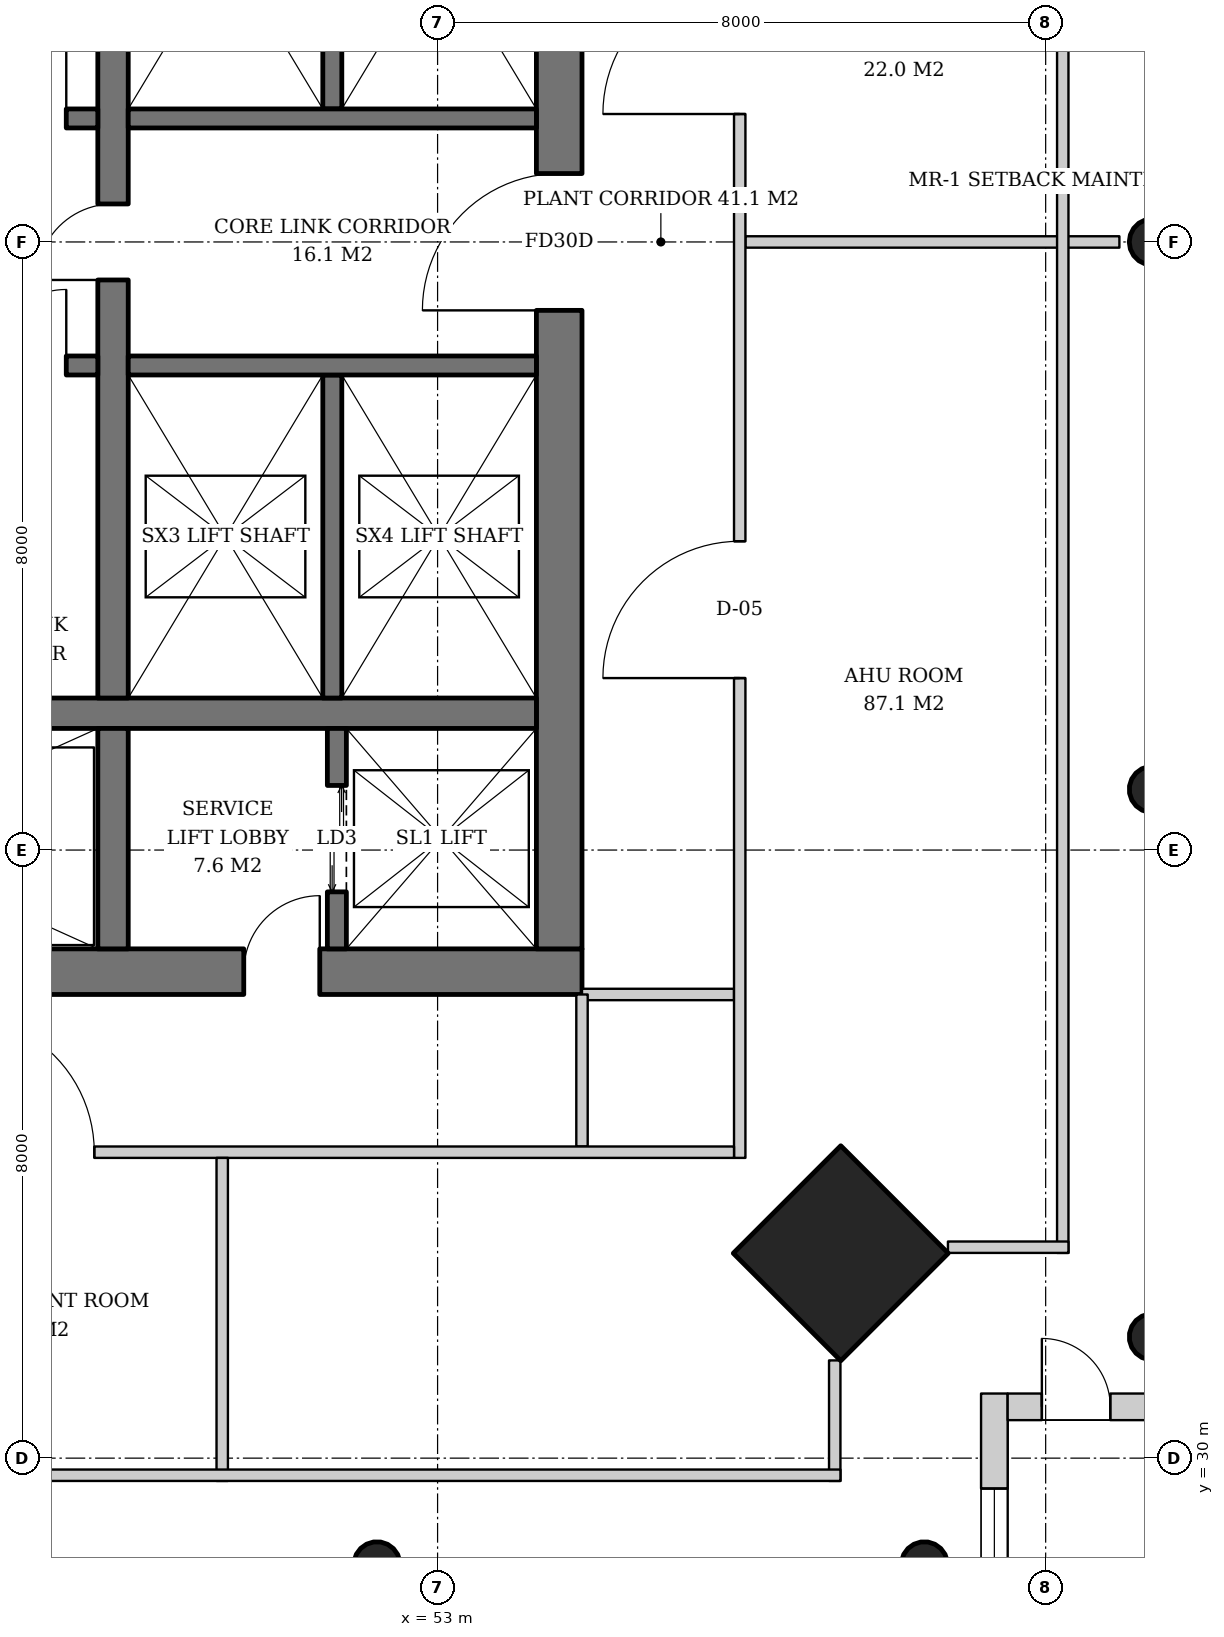
"""IFC4 building model, lengths in metres.
Left out: names, types, materials, properties, quantities, classifications, styles, units other than length and angle.
Written with IfcOpenShell. Run it as: python <this file> out.ifc"""

import sys

from ifc_helpers import new_model, si_unit, direction, frame, frame_2d, origin, origin_2d, place, context, subcontext, project, spatial, rectangle, hollow_circle, extrude, element, fill, save


model = new_model("IFC4")
c1 = context("Model", 3, precision=1e-05, world=origin(), true_north=direction((0.0, 1.0)))
c2 = subcontext(c1, "Body", "Model", "MODEL_VIEW")
j1 = project(units=[si_unit("LENGTHUNIT", "METRE"), si_unit("PLANEANGLEUNIT", "RADIAN")], contexts=[c1])
p1 = place(None, origin())
s1 = spatial("IfcSite", under=j1, at=p1, CompositionType="ELEMENT")
p2 = place(p1, origin())
s2 = spatial("IfcBuilding", under=s1, at=p2, CompositionType="ELEMENT")
p3 = place(p2, frame((0.0, 0.0, 226.2)))
s3 = spatial("IfcBuildingStorey", under=s2, at=p3, CompositionType="ELEMENT", Elevation=226.2)
p4 = place(p3, frame((62.443, 31.557, 0.0), z_axis=(-0.031898107953, 0.031898107953, 0.998981992539), x_axis=(-0.707106781187, -0.707106781187, 0.0)))
e1 = element("IfcColumn", 1, at=p4, inside=s3, PredefinedType="COLUMN", context=c2, shape_type="SweptSolid", body=[
    extrude(hollow_circle(Radius=0.305, WallThickness=0.025, at=origin_2d()), origin(), (0.0, 0.0, 1.0), 3.804),
])
p5 = place(p3, frame((62.443, 38.779, 0.0), z_axis=(-0.031910269556, 0.015987237665, 0.999362868496), x_axis=(-0.447933021895, -0.894067115991, 0.0)))
e2 = element("IfcColumn", 2, at=p5, inside=s3, PredefinedType="COLUMN", context=c2, shape_type="SweptSolid", body=[
    extrude(hollow_circle(Radius=0.305, WallThickness=0.025, at=origin_2d()), origin(), (0.0, 0.0, 1.0), 3.802),
])
p6 = place(p3, frame((62.443, 46.0, 0.0), z_axis=(-0.031914348339, 0.0, 0.999490607445), x_axis=(0.0, -1.0, 0.0)))
e3 = element("IfcColumn", 3, at=p6, inside=s3, PredefinedType="COLUMN", context=c2, shape_type="SweptSolid", body=[
    extrude(hollow_circle(Radius=0.305, WallThickness=0.025, at=origin_2d()), origin(), (0.0, 0.0, 1.0), 3.802),
])
p7 = place(p3, frame((58.343, 32.657, 0.0), z_axis=(-0.031898107953, 0.031898107953, 0.998981992539), x_axis=(-0.707106781187, -0.707106781187, 0.0)))
e4 = element("IfcColumn", 4, at=p7, inside=s3, PredefinedType="COLUMN", context=c2, shape_type="SweptSolid", body=[
    extrude(rectangle(XDim=2.0, YDim=2.0, at=origin_2d()), origin(), (0.0, 0.0, 1.0), 3.804),
])
p8 = place(p3, frame((59.443, 28.557, 0.0), z_axis=(-0.031898107953, 0.031898107953, 0.998981992539), x_axis=(-0.707106781187, -0.707106781187, 0.0)))
e5 = element("IfcColumn", 5, at=p8, inside=s3, PredefinedType="COLUMN", context=c2, shape_type="SweptSolid", body=[
    extrude(hollow_circle(Radius=0.305, WallThickness=0.025, at=origin_2d()), origin(), (0.0, 0.0, 1.0), 3.804),
])
p9 = place(p3, frame((52.221, 28.557, 0.0), z_axis=(-0.015987237665, 0.031910269556, 0.999362868496), x_axis=(-0.894067115991, -0.447933021895, 0.0)))
e6 = element("IfcColumn", 6, at=p9, inside=s3, PredefinedType="COLUMN", context=c2, shape_type="SweptSolid", body=[
    extrude(hollow_circle(Radius=0.305, WallThickness=0.025, at=origin_2d()), origin(), (0.0, 0.0, 1.0), 3.802),
])
p10 = place(p3, frame((35.1, 36.4, 0.0), z_axis=(0.0, 0.0, 1.0), x_axis=(1.0, 0.0, 0.0)))
e7 = element("IfcWall", 7, at=p10, inside=s3, PredefinedType="SHEAR", context=c2, shape_type="SweptSolid", body=[
    extrude(rectangle(XDim=19.8, YDim=0.6, at=frame_2d((9.9, 0.0))), origin(), (0.0, 0.0, 1.0), 3.8),
])
p11 = place(p10, frame((3.9, 0.0, 0.0)))
e8 = element("IfcOpeningElement", 8, at=p11, cuts=e7, PredefinedType="OPENING", context=c2, shape_type="SweptSolid", body=[
    extrude(rectangle(XDim=1.0, YDim=2.1, at=frame_2d((0.5, 1.05))), frame((0.0, 0.31, 0.0), z_axis=(0.0, -1.0, 0.0), x_axis=(1.0, 0.0, 0.0)), (0.0, 0.0, 1.0), 0.62),
])
p12 = place(p10, frame((15.35, 0.0, 0.0)))
e9 = element("IfcOpeningElement", 9, at=p12, cuts=e7, PredefinedType="OPENING", context=c2, shape_type="SweptSolid", body=[
    extrude(rectangle(XDim=1.0, YDim=2.1, at=frame_2d((0.5, 1.05))), frame((0.0, 0.31, 0.0), z_axis=(0.0, -1.0, 0.0), x_axis=(1.0, 0.0, 0.0)), (0.0, 0.0, 1.0), 0.62),
])
p13 = place(p3, frame((54.6, 36.7, 0.0), z_axis=(0.0, 0.0, 1.0), x_axis=(0.0, 1.0, 0.0)))
e10 = element("IfcWall", 10, at=p13, inside=s3, PredefinedType="SHEAR", context=c2, shape_type="SweptSolid", body=[
    extrude(rectangle(XDim=18.6, YDim=0.6, at=frame_2d((9.3, 0.0))), origin(), (0.0, 0.0, 1.0), 3.8),
])
p14 = place(p13, frame((8.4, 0.0, 0.0)))
e11 = element("IfcOpeningElement", 11, at=p14, cuts=e10, PredefinedType="OPENING", context=c2, shape_type="SweptSolid", body=[
    extrude(rectangle(XDim=1.8, YDim=2.4, at=frame_2d((0.9, 1.2))), frame((0.0, 0.31, 0.0), z_axis=(0.0, -1.0, 0.0), x_axis=(1.0, 0.0, 0.0)), (0.0, 0.0, 1.0), 0.62),
])
p15 = place(p3, frame((35.7, 39.8, 0.0), z_axis=(0.0, 0.0, 1.0), x_axis=(1.0, 0.0, 0.0)))
e12 = element("IfcWall", 12, at=p15, inside=s3, PredefinedType="SHEAR", context=c2, shape_type="SweptSolid", body=[
    extrude(rectangle(XDim=18.6, YDim=0.4, at=frame_2d((9.3, 0.0))), origin(), (0.0, 0.0, 1.0), 3.8),
])
p16 = place(p15, frame((3.3, 0.0, 0.0)))
e13 = element("IfcOpeningElement", 13, at=p16, cuts=e12, PredefinedType="OPENING", context=c2, shape_type="SweptSolid", body=[
    extrude(rectangle(XDim=1.0, YDim=2.1, at=frame_2d((0.5, 1.05))), frame((0.0, 0.21, 0.0), z_axis=(0.0, -1.0, 0.0), x_axis=(1.0, 0.0, 0.0)), (0.0, 0.0, 1.0), 0.42),
])
p17 = place(p3, frame((48.73, 36.7, 0.0), z_axis=(0.0, 0.0, 1.0), x_axis=(0.0, 1.0, 0.0)))
e14 = element("IfcWall", 14, at=p17, inside=s3, PredefinedType="SHEAR", context=c2, shape_type="SweptSolid", body=[
    extrude(rectangle(XDim=2.9, YDim=0.4, at=frame_2d((1.45, 0.0))), origin(), (0.0, 0.0, 1.0), 3.8),
])
p18 = place(p3, frame((48.73, 40.0, 0.0), z_axis=(0.0, 0.0, 1.0), x_axis=(0.0, 1.0, 0.0)))
e15 = element("IfcWall", 15, at=p18, inside=s3, PredefinedType="SHEAR", context=c2, shape_type="SweptSolid", body=[
    extrude(rectangle(XDim=12.0, YDim=0.4, at=frame_2d((6.0, 0.0))), origin(), (0.0, 0.0, 1.0), 3.8),
])
p19 = place(p18, frame((5.5, 0.0, 0.0)))
e16 = element("IfcOpeningElement", 16, at=p19, cuts=e15, PredefinedType="OPENING", context=c2, shape_type="SweptSolid", body=[
    extrude(rectangle(XDim=1.0, YDim=2.1, at=frame_2d((0.5, 1.05))), frame((0.0, 0.21, 0.0), z_axis=(0.0, -1.0, 0.0), x_axis=(1.0, 0.0, 0.0)), (0.0, 0.0, 1.0), 0.42),
])
p20 = place(p3, frame((60.325, 27.5, 0.0), z_axis=(0.0, 0.0, 1.0), x_axis=(0.0, 1.0, 0.0)))
e17 = element("IfcWall", 17, at=p20, inside=s3, PredefinedType="SOLIDWALL", context=c2, shape_type="SweptSolid", body=[
    extrude(rectangle(XDim=3.35, YDim=0.35, at=frame_2d((1.675, 0.0))), origin(), (0.0, 0.0, 1.0), 3.52),
])
p21 = place(p20, frame((0.9, 0.0, 0.6)))
e18 = element("IfcOpeningElement", 18, at=p21, cuts=e17, PredefinedType="OPENING", context=c2, shape_type="SweptSolid", body=[
    extrude(rectangle(XDim=1.2, YDim=2.55, at=frame_2d((0.6, 1.275))), frame((0.0, 0.185, 0.0), z_axis=(0.0, -1.0, 0.0), x_axis=(1.0, 0.0, 0.0)), (0.0, 0.0, 1.0), 0.37),
])
p22 = place(p3, frame((60.5, 30.675, 0.0), z_axis=(0.0, 0.0, 1.0), x_axis=(1.0, 0.0, 0.0)))
e19 = element("IfcWall", 19, at=p22, inside=s3, PredefinedType="SOLIDWALL", context=c2, shape_type="SweptSolid", body=[
    extrude(rectangle(XDim=3.0, YDim=0.35, at=frame_2d((1.5, 0.0))), origin(), (0.0, 0.0, 1.0), 3.52),
])
p23 = place(p22, frame((0.45, 0.0, 0.0)))
e20 = element("IfcOpeningElement", 20, at=p23, cuts=e19, PredefinedType="OPENING", context=c2, shape_type="SweptSolid", body=[
    extrude(rectangle(XDim=0.9, YDim=2.1, at=frame_2d((0.45, 1.05))), frame((0.0, 0.185, 0.0), z_axis=(0.0, -1.0, 0.0), x_axis=(1.0, 0.0, 0.0)), (0.0, 0.0, 1.0), 0.37),
])
p24 = place(p3, frame((51.675, 36.7, 0.0), z_axis=(0.0, 0.0, 1.0), x_axis=(0.0, 1.0, 0.0)))
e21 = element("IfcWall", 21, at=p24, inside=s3, PredefinedType="SHEAR", context=c2, shape_type="SweptSolid", body=[
    extrude(rectangle(XDim=2.9, YDim=0.25, at=frame_2d((1.45, 0.0))), origin(), (0.0, 0.0, 1.0), 3.8),
])
p25 = place(p24, frame((0.75, 0.0, 0.0)))
e22 = element("IfcOpeningElement", 22, at=p25, cuts=e21, PredefinedType="OPENING", context=c2, shape_type="SweptSolid", body=[
    extrude(rectangle(XDim=1.4, YDim=2.4, at=frame_2d((0.7, 1.2))), frame((0.0, 0.135, 0.0), z_axis=(0.0, -1.0, 0.0), x_axis=(1.0, 0.0, 0.0)), (0.0, 0.0, 1.0), 0.27),
])
p26 = place(p3, frame((35.7, 47.625, 0.0), z_axis=(0.0, 0.0, 1.0), x_axis=(1.0, 0.0, 0.0)))
e23 = element("IfcWall", 23, at=p26, inside=s3, PredefinedType="SHEAR", context=c2, shape_type="SweptSolid", body=[
    extrude(rectangle(XDim=12.83, YDim=0.25, at=frame_2d((6.415, 0.0))), origin(), (0.0, 0.0, 1.0), 3.8),
])
p27 = place(p26, frame((9.0, 0.0, 0.0)))
e24 = element("IfcOpeningElement", 24, at=p27, cuts=e23, PredefinedType="OPENING", context=c2, shape_type="SweptSolid", body=[
    extrude(rectangle(XDim=1.0, YDim=2.1, at=frame_2d((0.5, 1.05))), frame((0.0, 0.135, 0.0), z_axis=(0.0, -1.0, 0.0), x_axis=(1.0, 0.0, 0.0)), (0.0, 0.0, 1.0), 0.27),
])
p28 = place(p26, frame((11.415, 0.0, 0.0)))
e25 = element("IfcOpeningElement", 25, at=p28, cuts=e23, PredefinedType="OPENING", context=c2, shape_type="SweptSolid", body=[
    extrude(rectangle(XDim=1.0, YDim=2.1, at=frame_2d((0.5, 1.05))), frame((0.0, 0.135, 0.0), z_axis=(0.0, -1.0, 0.0), x_axis=(1.0, 0.0, 0.0)), (0.0, 0.0, 1.0), 0.27),
])
p29 = place(p3, frame((35.7, 44.375, 0.0), z_axis=(0.0, 0.0, 1.0), x_axis=(1.0, 0.0, 0.0)))
e26 = element("IfcWall", 26, at=p29, inside=s3, PredefinedType="SHEAR", context=c2, shape_type="SweptSolid", body=[
    extrude(rectangle(XDim=12.83, YDim=0.25, at=frame_2d((6.415, 0.0))), origin(), (0.0, 0.0, 1.0), 3.8),
])
p30 = place(p29, frame((9.0, 0.0, 0.0)))
e27 = element("IfcOpeningElement", 27, at=p30, cuts=e26, PredefinedType="OPENING", context=c2, shape_type="SweptSolid", body=[
    extrude(rectangle(XDim=1.0, YDim=2.1, at=frame_2d((0.5, 1.05))), frame((0.0, 0.135, 0.0), z_axis=(0.0, -1.0, 0.0), x_axis=(1.0, 0.0, 0.0)), (0.0, 0.0, 1.0), 0.27),
])
p31 = place(p29, frame((11.415, 0.0, 0.0)))
e28 = element("IfcOpeningElement", 28, at=p31, cuts=e26, PredefinedType="OPENING", context=c2, shape_type="SweptSolid", body=[
    extrude(rectangle(XDim=1.0, YDim=2.1, at=frame_2d((0.5, 1.05))), frame((0.0, 0.135, 0.0), z_axis=(0.0, -1.0, 0.0), x_axis=(1.0, 0.0, 0.0)), (0.0, 0.0, 1.0), 0.27),
])
p32 = place(p3, frame((51.615, 47.75, 0.0), z_axis=(0.0, 0.0, 1.0), x_axis=(0.0, 1.0, 0.0)))
e29 = element("IfcWall", 29, at=p32, inside=s3, PredefinedType="SHEAR", context=c2, shape_type="SweptSolid", body=[
    extrude(rectangle(XDim=4.25, YDim=0.25, at=frame_2d((2.125, 0.0))), origin(), (0.0, 0.0, 1.0), 3.8),
])
p33 = place(p3, frame((48.93, 47.625, 0.0), z_axis=(0.0, 0.0, 1.0), x_axis=(1.0, 0.0, 0.0)))
e30 = element("IfcWall", 30, at=p33, inside=s3, PredefinedType="SHEAR", context=c2, shape_type="SweptSolid", body=[
    extrude(rectangle(XDim=5.37, YDim=0.25, at=frame_2d((2.685, 0.0))), origin(), (0.0, 0.0, 1.0), 3.8),
])
p34 = place(p3, frame((51.615, 44.25, 0.0), z_axis=(0.0, 0.0, 1.0), x_axis=(0.0, -1.0, 0.0)))
e31 = element("IfcWall", 31, at=p34, inside=s3, PredefinedType="SHEAR", context=c2, shape_type="SweptSolid", body=[
    extrude(rectangle(XDim=4.25, YDim=0.25, at=frame_2d((2.125, 0.0))), origin(), (0.0, 0.0, 1.0), 3.8),
])
p35 = place(p3, frame((48.93, 44.375, 0.0), z_axis=(0.0, 0.0, 1.0), x_axis=(1.0, 0.0, 0.0)))
e32 = element("IfcWall", 32, at=p35, inside=s3, PredefinedType="SHEAR", context=c2, shape_type="SweptSolid", body=[
    extrude(rectangle(XDim=5.37, YDim=0.25, at=frame_2d((2.685, 0.0))), origin(), (0.0, 0.0, 1.0), 3.8),
])
p36 = place(p3, frame((54.9, 36.1, 0.0), z_axis=(0.0, 0.0, 1.0), x_axis=(1.0, 0.0, 0.0)))
e33 = element("IfcWall", 33, at=p36, inside=s3, PredefinedType="PARTITIONING", context=c2, shape_type="SweptSolid", body=[
    extrude(rectangle(XDim=2.0, YDim=0.15, at=frame_2d((1.0, 0.0))), origin(), (0.0, 0.0, 1.0), 3.52),
])
p37 = place(p3, frame((57.05, 46.0, 0.0), z_axis=(0.0, 0.0, 1.0), x_axis=(1.0, 0.0, 0.0)))
e34 = element("IfcWall", 34, at=p37, inside=s3, PredefinedType="SOLIDWALL", context=c2, shape_type="SweptSolid", body=[
    extrude(rectangle(XDim=4.92, YDim=0.15, at=frame_2d((2.46, 0.0))), origin(), (0.0, 0.0, 1.0), 3.52),
])
p38 = place(p3, frame((56.975, 33.95, 0.0), z_axis=(0.0, 0.0, 1.0), x_axis=(0.0, 1.0, 0.0)))
e35 = element("IfcWall", 35, at=p38, inside=s3, PredefinedType="SOLIDWALL", context=c2, shape_type="SweptSolid", body=[
    extrude(rectangle(XDim=23.95, YDim=0.15, at=frame_2d((11.975, 0.0))), origin(), (0.0, 0.0, 1.0), 2.706),
])
p39 = place(p38, frame((6.312, 0.0, 0.0)))
e36 = element("IfcOpeningElement", 36, at=p39, cuts=e35, PredefinedType="OPENING", context=c2, shape_type="SweptSolid", body=[
    extrude(rectangle(XDim=1.8, YDim=2.4, at=frame_2d((0.9, 1.2))), frame((0.0, 0.085, 0.0), z_axis=(0.0, -1.0, 0.0), x_axis=(1.0, 0.0, 0.0)), (0.0, 0.0, 1.0), 0.17),
])
p40 = place(p38, frame((13.733, 0.0, 0.0)))
e37 = element("IfcOpeningElement", 37, at=p40, cuts=e35, PredefinedType="OPENING", context=c2, shape_type="SweptSolid", body=[
    extrude(rectangle(XDim=1.8, YDim=2.4, at=frame_2d((0.9, 1.2))), frame((0.0, 0.085, 0.0), z_axis=(0.0, -1.0, 0.0), x_axis=(1.0, 0.0, 0.0)), (0.0, 0.0, 1.0), 0.17),
])
p41 = place(p3, frame((54.9, 36.1, 0.0), z_axis=(0.0, 0.0, 1.0), x_axis=(0.0, -1.0, 0.0)))
e38 = element("IfcWall", 38, at=p41, inside=s3, PredefinedType="PARTITIONING", context=c2, shape_type="SweptSolid", body=[
    extrude(rectangle(XDim=2.0, YDim=0.15, at=frame_2d((1.0, 0.0))), origin(), (0.0, 0.0, 1.0), 3.52),
])
p42 = place(p3, frame((32.95, 34.025, 0.0), z_axis=(0.0, 0.0, 1.0), x_axis=(1.0, 0.0, 0.0)))
e39 = element("IfcWall", 39, at=p42, inside=s3, PredefinedType="SOLIDWALL", context=c2, shape_type="SweptSolid", body=[
    extrude(rectangle(XDim=23.95, YDim=0.15, at=frame_2d((11.975, 0.0))), origin(), (0.0, 0.0, 1.0), 2.706),
])
p43 = place(p42, frame((6.312, 0.0, 0.0)))
e40 = element("IfcOpeningElement", 40, at=p43, cuts=e39, PredefinedType="OPENING", context=c2, shape_type="SweptSolid", body=[
    extrude(rectangle(XDim=1.8, YDim=2.4, at=frame_2d((0.9, 1.2))), frame((0.0, 0.085, 0.0), z_axis=(0.0, -1.0, 0.0), x_axis=(1.0, 0.0, 0.0)), (0.0, 0.0, 1.0), 0.17),
])
p44 = place(p42, frame((13.733, 0.0, 0.0)))
e41 = element("IfcOpeningElement", 41, at=p44, cuts=e39, PredefinedType="OPENING", context=c2, shape_type="SweptSolid", body=[
    extrude(rectangle(XDim=1.8, YDim=2.4, at=frame_2d((0.9, 1.2))), frame((0.0, 0.085, 0.0), z_axis=(0.0, -1.0, 0.0), x_axis=(1.0, 0.0, 0.0)), (0.0, 0.0, 1.0), 0.17),
])
p45 = place(p3, frame((50.167, 33.95, 0.0), z_axis=(0.0, 0.0, 1.0), x_axis=(0.0, -1.0, 0.0)))
e42 = element("IfcWall", 42, at=p45, inside=s3, PredefinedType="SOLIDWALL", context=c2, shape_type="SweptSolid", body=[
    extrude(rectangle(XDim=4.25, YDim=0.15, at=frame_2d((2.125, 0.0))), origin(), (0.0, 0.0, 1.0), 3.52),
])
p46 = place(p3, frame((61.225, 59.3, 0.0), z_axis=(0.0, 0.0, 1.0), x_axis=(0.0, -1.0, 0.0)))
e43 = element("IfcWall", 43, at=p46, inside=s3, PredefinedType="PARTITIONING", context=c2, shape_type="SweptSolid", body=[
    extrude(rectangle(XDim=26.6, YDim=0.15, at=frame_2d((13.3, 0.0))), origin(), (0.0, 0.0, 1.0), 2.706),
])
for number, where, z_axis, x_axis in (
    (44, (61.3, 32.775, 0.0), (0.0, 0.0, 1.0), (-1.0, 0.0, 0.0)),
    (45, (58.225, 31.286, 0.0), (0.0, 0.0, 1.0), (0.0, -1.0, 0.0)),
):
    element("IfcWall", number, at=place(p3, frame(where, z_axis=z_axis, x_axis=x_axis)), inside=s3, PredefinedType="PARTITIONING", context=c2, shape_type="SweptSolid", body=[
        extrude(rectangle(XDim=1.586, YDim=0.15, at=frame_2d((0.793, 0.0))), origin(), (0.0, 0.0, 1.0), 3.52),
    ])
p47 = place(p3, frame((58.3, 29.775, 0.0), z_axis=(0.0, 0.0, 1.0), x_axis=(-1.0, 0.0, 0.0)))
e46 = element("IfcWall", 46, at=p47, inside=s3, PredefinedType="PARTITIONING", context=c2, shape_type="SweptSolid", body=[
    extrude(rectangle(XDim=26.6, YDim=0.15, at=frame_2d((13.3, 0.0))), origin(), (0.0, 0.0, 1.0), 2.706),
])
p48 = place(p21, origin())
e47 = element("IfcWindow", 47, at=p48, inside=s3, PartitioningType="SINGLE_PANEL", PredefinedType="USERDEFINED", context=c2, shape_type="SweptSolid", body=[
    extrude(rectangle(XDim=1.2, YDim=2.55, at=frame_2d((0.6, 1.275))), frame((0.0, 0.03, 0.0), z_axis=(0.0, -1.0, 0.0), x_axis=(1.0, 0.0, 0.0)), (0.0, 0.0, 1.0), 0.06),
])
fill(e18, e47)
p49 = place(p23, origin())
e48 = element("IfcDoor", 48, at=p49, inside=s3, OperationType="SINGLE_SWING_LEFT", PredefinedType="DOOR", context=c2, shape_type="SweptSolid", body=[
    extrude(rectangle(XDim=0.9, YDim=2.1, at=frame_2d((0.45, 1.05))), frame((0.0, 0.025, 0.0), z_axis=(0.0, -1.0, 0.0), x_axis=(1.0, 0.0, 0.0)), (0.0, 0.0, 1.0), 0.05),
])
fill(e20, e48)
p50 = place(p25, origin())
e49 = element("IfcDoor", 49, at=p50, inside=s3, OperationType="DOUBLE_DOOR_SLIDING", PredefinedType="DOOR", context=c2, shape_type="SweptSolid", body=[
    extrude(rectangle(XDim=1.4, YDim=2.4, at=frame_2d((0.7, 1.2))), frame((0.0, 0.025, 0.0), z_axis=(0.0, -1.0, 0.0), x_axis=(1.0, 0.0, 0.0)), (0.0, 0.0, 1.0), 0.05),
])
fill(e22, e49)
p51 = place(p28, origin())
e50 = element("IfcDoor", 50, at=p51, inside=s3, OperationType="SINGLE_SWING_RIGHT", PredefinedType="DOOR", context=c2, shape_type="SweptSolid", body=[
    extrude(rectangle(XDim=1.0, YDim=2.1, at=frame_2d((0.5, 1.05))), frame((0.0, 0.025, 0.0), z_axis=(0.0, -1.0, 0.0), x_axis=(1.0, 0.0, 0.0)), (0.0, 0.0, 1.0), 0.05),
])
fill(e25, e50)
p52 = place(p31, origin())
e51 = element("IfcDoor", 51, at=p52, inside=s3, OperationType="SINGLE_SWING_RIGHT", PredefinedType="DOOR", context=c2, shape_type="SweptSolid", body=[
    extrude(rectangle(XDim=1.0, YDim=2.1, at=frame_2d((0.5, 1.05))), frame((0.0, 0.025, 0.0), z_axis=(0.0, -1.0, 0.0), x_axis=(1.0, 0.0, 0.0)), (0.0, 0.0, 1.0), 0.05),
])
fill(e28, e51)
p53 = place(p19, origin())
e52 = element("IfcDoor", 52, at=p53, inside=s3, OperationType="SINGLE_SWING_LEFT", PredefinedType="DOOR", context=c2, shape_type="SweptSolid", body=[
    extrude(rectangle(XDim=1.0, YDim=2.1, at=frame_2d((0.5, 1.05))), frame((0.0, 0.025, 0.0), z_axis=(0.0, -1.0, 0.0), x_axis=(1.0, 0.0, 0.0)), (0.0, 0.0, 1.0), 0.05),
])
fill(e16, e52)
p54 = place(p14, origin())
e53 = element("IfcDoor", 53, at=p54, inside=s3, OperationType="DOUBLE_DOOR_SINGLE_SWING", PredefinedType="DOOR", context=c2, shape_type="SweptSolid", body=[
    extrude(rectangle(XDim=1.8, YDim=2.4, at=frame_2d((0.9, 1.2))), frame((0.0, 0.025, 0.0), z_axis=(0.0, -1.0, 0.0), x_axis=(1.0, 0.0, 0.0)), (0.0, 0.0, 1.0), 0.05),
])
fill(e11, e53)
p55 = place(p12, origin())
e54 = element("IfcDoor", 54, at=p55, inside=s3, OperationType="SINGLE_SWING_RIGHT", PredefinedType="DOOR", context=c2, shape_type="SweptSolid", body=[
    extrude(rectangle(XDim=1.0, YDim=2.1, at=frame_2d((0.5, 1.05))), frame((0.0, 0.025, 0.0), z_axis=(0.0, -1.0, 0.0), x_axis=(1.0, 0.0, 0.0)), (0.0, 0.0, 1.0), 0.05),
])
fill(e9, e54)
p56 = place(p39, origin())
e55 = element("IfcDoor", 55, at=p56, inside=s3, OperationType="DOUBLE_DOOR_SINGLE_SWING", PredefinedType="DOOR", context=c2, shape_type="SweptSolid", body=[
    extrude(rectangle(XDim=1.8, YDim=2.4, at=frame_2d((0.9, 1.2))), frame((0.0, 0.025, 0.0), z_axis=(0.0, -1.0, 0.0), x_axis=(1.0, 0.0, 0.0)), (0.0, 0.0, 1.0), 0.05),
])
fill(e36, e55)
p57 = place(p40, origin())
e56 = element("IfcDoor", 56, at=p57, inside=s3, OperationType="DOUBLE_DOOR_SINGLE_SWING", PredefinedType="DOOR", context=c2, shape_type="SweptSolid", body=[
    extrude(rectangle(XDim=1.8, YDim=2.4, at=frame_2d((0.9, 1.2))), frame((0.0, 0.025, 0.0), z_axis=(0.0, -1.0, 0.0), x_axis=(1.0, 0.0, 0.0)), (0.0, 0.0, 1.0), 0.05),
])
fill(e37, e56)
p58 = place(p44, origin())
e57 = element("IfcDoor", 57, at=p58, inside=s3, OperationType="DOUBLE_DOOR_SINGLE_SWING", PredefinedType="DOOR", context=c2, shape_type="SweptSolid", body=[
    extrude(rectangle(XDim=1.8, YDim=2.4, at=frame_2d((0.9, 1.2))), frame((0.0, 0.025, 0.0), z_axis=(0.0, -1.0, 0.0), x_axis=(1.0, 0.0, 0.0)), (0.0, 0.0, 1.0), 0.05),
])
fill(e41, e57)
save(model, sys.argv[1])
